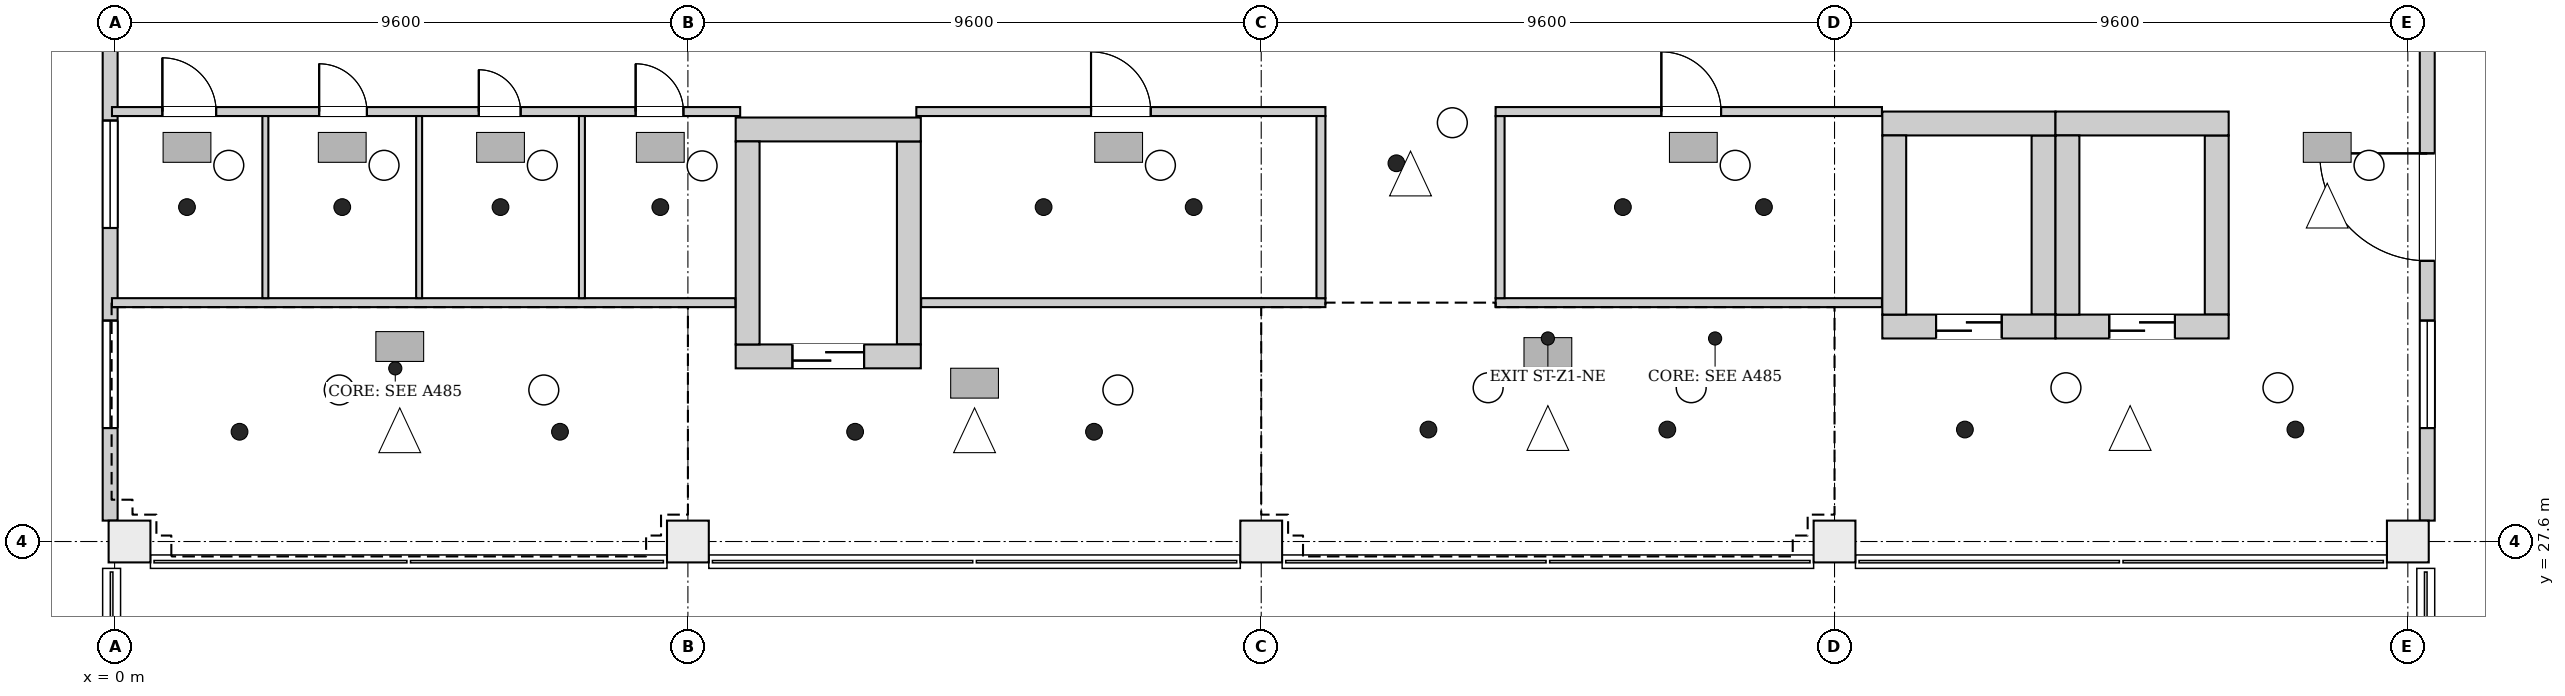
"""IFC4 building model, lengths in metres.
Left out: names, types, materials, properties, quantities, classifications, styles, units other than length and angle.
Written with IfcOpenShell. Run it as: python <this file> out.ifc"""

import sys

from ifc_helpers import new_model, si_unit, direction, frame, frame_2d, origin, origin_2d, place, context, subcontext, project, spatial, rectangle, extrude, element, fill, save


model = new_model("IFC4")
c1 = context("Model", 3, precision=1e-05, world=origin(), true_north=direction((0.0, 1.0)))
c2 = subcontext(c1, "Body", "Model", "MODEL_VIEW")
j1 = project(units=[si_unit("LENGTHUNIT", "METRE"), si_unit("PLANEANGLEUNIT", "RADIAN")], contexts=[c1])
p1 = place(None, origin())
s1 = spatial("IfcSite", under=j1, at=p1, CompositionType="ELEMENT")
p2 = place(p1, origin())
s2 = spatial("IfcBuilding", under=s1, at=p2, CompositionType="ELEMENT")
p3 = place(p2, frame((0.0, 0.0, 69.7)))
s3 = spatial("IfcBuildingStorey", under=s2, at=p3, CompositionType="ELEMENT", Elevation=69.7)
p4 = place(p3, frame((10.4, 30.7, 0.0), z_axis=(0.0, 0.0, 1.0), x_axis=(1.0, 0.0, 0.0)))
e1 = element("IfcWall", 1, at=p4, inside=s3, PredefinedType="SHEAR", context=c2, shape_type="SweptSolid", body=[
    extrude(rectangle(XDim=3.1, YDim=0.4, at=frame_2d((1.55, 0.0))), origin(), (0.0, 0.0, 1.0), 4.2),
])
p5 = place(p4, frame((0.95, 0.0, 0.0)))
e2 = element("IfcOpeningElement", 2, at=p5, cuts=e1, PredefinedType="OPENING", context=c2, shape_type="SweptSolid", body=[
    extrude(rectangle(XDim=1.2, YDim=2.1, at=frame_2d((0.6, 1.05))), frame((0.0, 0.21, 0.0), z_axis=(0.0, -1.0, 0.0), x_axis=(1.0, 0.0, 0.0)), (0.0, 0.0, 1.0), 0.42),
])
p6 = place(p3, frame((10.4, 34.5, 0.0), z_axis=(0.0, 0.0, 1.0), x_axis=(1.0, 0.0, 0.0)))
e3 = element("IfcWall", 3, at=p6, inside=s3, PredefinedType="SHEAR", context=c2, shape_type="SweptSolid", body=[
    extrude(rectangle(XDim=3.1, YDim=0.4, at=frame_2d((1.55, 0.0))), origin(), (0.0, 0.0, 1.0), 4.2),
])
for number, where, z_axis, x_axis in (
    (4, (10.6, 30.9, 0.0), (0.0, 0.0, 1.0), (0.0, 1.0, 0.0)),
    (5, (13.3, 30.9, 0.0), (0.0, 0.0, 1.0), (0.0, 1.0, 0.0)),
):
    element("IfcWall", number, at=place(p3, frame(where, z_axis=z_axis, x_axis=x_axis)), inside=s3, PredefinedType="SHEAR", context=c2, shape_type="SweptSolid", body=[
        extrude(rectangle(XDim=3.4, YDim=0.4, at=frame_2d((1.7, 0.0))), origin(), (0.0, 0.0, 1.0), 4.2),
    ])
p7 = place(p3, frame((29.6, 31.2, 0.0), z_axis=(0.0, 0.0, 1.0), x_axis=(1.0, 0.0, 0.0)))
e6 = element("IfcWall", 6, at=p7, inside=s3, PredefinedType="SHEAR", context=c2, shape_type="SweptSolid", body=[
    extrude(rectangle(XDim=2.9, YDim=0.4, at=frame_2d((1.45, 0.0))), origin(), (0.0, 0.0, 1.0), 4.2),
])
p8 = place(p7, frame((0.9, 0.0, 0.0)))
e7 = element("IfcOpeningElement", 7, at=p8, cuts=e6, PredefinedType="OPENING", context=c2, shape_type="SweptSolid", body=[
    extrude(rectangle(XDim=1.1, YDim=2.1, at=frame_2d((0.55, 1.05))), frame((0.0, 0.21, 0.0), z_axis=(0.0, -1.0, 0.0), x_axis=(1.0, 0.0, 0.0)), (0.0, 0.0, 1.0), 0.42),
])
p9 = place(p3, frame((29.6, 34.6, 0.0), z_axis=(0.0, 0.0, 1.0), x_axis=(1.0, 0.0, 0.0)))
e8 = element("IfcWall", 8, at=p9, inside=s3, PredefinedType="SHEAR", context=c2, shape_type="SweptSolid", body=[
    extrude(rectangle(XDim=2.9, YDim=0.4, at=frame_2d((1.45, 0.0))), origin(), (0.0, 0.0, 1.0), 4.2),
])
for number, where, z_axis, x_axis in (
    (9, (29.8, 31.4, 0.0), (0.0, 0.0, 1.0), (0.0, 1.0, 0.0)),
    (10, (32.3, 31.4, 0.0), (0.0, 0.0, 1.0), (0.0, 1.0, 0.0)),
):
    element("IfcWall", number, at=place(p3, frame(where, z_axis=z_axis, x_axis=x_axis)), inside=s3, PredefinedType="SHEAR", context=c2, shape_type="SweptSolid", body=[
        extrude(rectangle(XDim=3.0, YDim=0.4, at=frame_2d((1.5, 0.0))), origin(), (0.0, 0.0, 1.0), 4.2),
    ])
p10 = place(p3, frame((32.5, 31.2, 0.0), z_axis=(0.0, 0.0, 1.0), x_axis=(1.0, 0.0, 0.0)))
e11 = element("IfcWall", 11, at=p10, inside=s3, PredefinedType="SHEAR", context=c2, shape_type="SweptSolid", body=[
    extrude(rectangle(XDim=2.9, YDim=0.4, at=frame_2d((1.45, 0.0))), origin(), (0.0, 0.0, 1.0), 4.2),
])
p11 = place(p10, frame((0.9, 0.0, 0.0)))
e12 = element("IfcOpeningElement", 12, at=p11, cuts=e11, PredefinedType="OPENING", context=c2, shape_type="SweptSolid", body=[
    extrude(rectangle(XDim=1.1, YDim=2.1, at=frame_2d((0.55, 1.05))), frame((0.0, 0.21, 0.0), z_axis=(0.0, -1.0, 0.0), x_axis=(1.0, 0.0, 0.0)), (0.0, 0.0, 1.0), 0.42),
])
p12 = place(p3, frame((32.5, 34.6, 0.0), z_axis=(0.0, 0.0, 1.0), x_axis=(1.0, 0.0, 0.0)))
e13 = element("IfcWall", 13, at=p12, inside=s3, PredefinedType="SHEAR", context=c2, shape_type="SweptSolid", body=[
    extrude(rectangle(XDim=2.9, YDim=0.4, at=frame_2d((1.45, 0.0))), origin(), (0.0, 0.0, 1.0), 4.2),
])
for number, where, z_axis, x_axis in (
    (14, (32.7, 31.4, 0.0), (0.0, 0.0, 1.0), (0.0, 1.0, 0.0)),
    (15, (35.2, 31.4, 0.0), (0.0, 0.0, 1.0), (0.0, 1.0, 0.0)),
):
    element("IfcWall", number, at=place(p3, frame(where, z_axis=z_axis, x_axis=x_axis)), inside=s3, PredefinedType="SHEAR", context=c2, shape_type="SweptSolid", body=[
        extrude(rectangle(XDim=3.0, YDim=0.4, at=frame_2d((1.5, 0.0))), origin(), (0.0, 0.0, 1.0), 4.2),
    ])
for number, where, z_axis, x_axis in (
    (16, (0.25, 27.6, 0.0), (0.0, 0.0, 1.0), (1.0, 0.0, 0.0)),
    (17, (9.6, 27.6, 0.0), (0.0, 0.0, 1.0), (1.0, 0.0, 0.0)),
    (18, (19.2, 27.6, 0.0), (0.0, 0.0, 1.0), (1.0, 0.0, 0.0)),
    (19, (28.8, 27.6, 0.0), (0.0, 0.0, 1.0), (1.0, 0.0, 0.0)),
    (20, (38.4, 27.6, 0.0), (0.0, 0.0, 1.0), (1.0, 0.0, 0.0)),
):
    element("IfcColumn", number, at=place(p3, frame(where, z_axis=z_axis, x_axis=x_axis)), inside=s3, PredefinedType="COLUMN", context=c2, shape_type="SweptSolid", body=[
        extrude(rectangle(XDim=0.7, YDim=0.7, at=origin_2d()), origin(), (0.0, 0.0, 1.0), 4.2),
    ])
p13 = place(p3, frame((-0.074, 36.45, 0.0), z_axis=(0.0, 0.0, 1.0), x_axis=(0.0, -1.0, 0.0)))
e21 = element("IfcWall", 21, at=p13, inside=s3, PredefinedType="ELEMENTEDWALL", context=c2, shape_type="SweptSolid", body=[
    extrude(rectangle(XDim=8.5, YDim=0.25, at=frame_2d((4.25, 0.0))), origin(), (0.0, 0.0, 1.0), 3.9),
])
p14 = place(p13, frame((5.15, 0.0, 0.9)))
e22 = element("IfcOpeningElement", 22, at=p14, cuts=e21, PredefinedType="OPENING", context=c2, shape_type="SweptSolid", body=[
    extrude(rectangle(XDim=1.8, YDim=2.6, at=frame_2d((0.9, 1.3))), frame((0.0, 0.135, 0.0), z_axis=(0.0, -1.0, 0.0), x_axis=(1.0, 0.0, 0.0)), (0.0, 0.0, 1.0), 0.27),
])
p15 = place(p13, frame((1.8, 0.0, 0.9)))
e23 = element("IfcOpeningElement", 23, at=p15, cuts=e21, PredefinedType="OPENING", context=c2, shape_type="SweptSolid", body=[
    extrude(rectangle(XDim=1.8, YDim=2.6, at=frame_2d((0.9, 1.3))), frame((0.0, 0.135, 0.0), z_axis=(0.0, -1.0, 0.0), x_axis=(1.0, 0.0, 0.0)), (0.0, 0.0, 1.0), 0.27),
])
p16 = place(p3, frame((38.725, 27.95, 0.0), z_axis=(0.0, 0.0, 1.0), x_axis=(0.0, 1.0, 0.0)))
e24 = element("IfcWall", 24, at=p16, inside=s3, PredefinedType="ELEMENTEDWALL", context=c2, shape_type="SweptSolid", body=[
    extrude(rectangle(XDim=8.5, YDim=0.25, at=frame_2d((4.25, 0.0))), origin(), (0.0, 0.0, 1.0), 3.9),
])
p17 = place(p16, frame((4.35, 0.0, 0.0)))
e25 = element("IfcOpeningElement", 25, at=p17, cuts=e24, PredefinedType="OPENING", context=c2, shape_type="SweptSolid", body=[
    extrude(rectangle(XDim=1.8, YDim=2.4, at=frame_2d((0.9, 1.2))), frame((0.0, 0.135, 0.0), z_axis=(0.0, -1.0, 0.0), x_axis=(1.0, 0.0, 0.0)), (0.0, 0.0, 1.0), 0.27),
])
p18 = place(p16, frame((1.55, 0.0, 0.9)))
e26 = element("IfcOpeningElement", 26, at=p18, cuts=e24, PredefinedType="OPENING", context=c2, shape_type="SweptSolid", body=[
    extrude(rectangle(XDim=1.8, YDim=2.6, at=frame_2d((0.9, 1.3))), frame((0.0, 0.135, 0.0), z_axis=(0.0, -1.0, 0.0), x_axis=(1.0, 0.0, 0.0)), (0.0, 0.0, 1.0), 0.27),
])
p19 = place(p3, frame((-0.044, 31.6, 0.0), z_axis=(0.0, 0.0, 1.0), x_axis=(1.0, 0.0, 0.0)))
e27 = element("IfcWall", 27, at=p19, inside=s3, PredefinedType="PARTITIONING", context=c2, shape_type="SweptSolid", body=[
    extrude(rectangle(XDim=10.438, YDim=0.15, at=frame_2d((5.219, 0.0))), origin(), (0.0, 0.0, 1.0), 3.9),
])
p20 = place(p3, frame((-0.044, 34.8, 0.0), z_axis=(0.0, 0.0, 1.0), x_axis=(1.0, 0.0, 0.0)))
e28 = element("IfcWall", 28, at=p20, inside=s3, PredefinedType="PARTITIONING", context=c2, shape_type="SweptSolid", body=[
    extrude(rectangle(XDim=10.519, YDim=0.15, at=frame_2d((5.26, 0.0))), origin(), (0.0, 0.0, 1.0), 3.9),
])
p21 = place(p20, frame((0.844, 0.0, 0.0)))
e29 = element("IfcOpeningElement", 29, at=p21, cuts=e28, PredefinedType="OPENING", context=c2, shape_type="SweptSolid", body=[
    extrude(rectangle(XDim=0.9, YDim=2.1, at=frame_2d((0.45, 1.05))), frame((0.0, 0.085, 0.0), z_axis=(0.0, -1.0, 0.0), x_axis=(1.0, 0.0, 0.0)), (0.0, 0.0, 1.0), 0.17),
])
p22 = place(p20, frame((3.469, 0.0, 0.0)))
e30 = element("IfcOpeningElement", 30, at=p22, cuts=e28, PredefinedType="OPENING", context=c2, shape_type="SweptSolid", body=[
    extrude(rectangle(XDim=0.8, YDim=2.1, at=frame_2d((0.4, 1.05))), frame((0.0, 0.085, 0.0), z_axis=(0.0, -1.0, 0.0), x_axis=(1.0, 0.0, 0.0)), (0.0, 0.0, 1.0), 0.17),
])
p23 = place(p20, frame((6.143, 0.0, 0.0)))
e31 = element("IfcOpeningElement", 31, at=p23, cuts=e28, PredefinedType="OPENING", context=c2, shape_type="SweptSolid", body=[
    extrude(rectangle(XDim=0.7, YDim=2.1, at=frame_2d((0.35, 1.05))), frame((0.0, 0.085, 0.0), z_axis=(0.0, -1.0, 0.0), x_axis=(1.0, 0.0, 0.0)), (0.0, 0.0, 1.0), 0.17),
])
p24 = place(p20, frame((8.769, 0.0, 0.0)))
e32 = element("IfcOpeningElement", 32, at=p24, cuts=e28, PredefinedType="OPENING", context=c2, shape_type="SweptSolid", body=[
    extrude(rectangle(XDim=0.8, YDim=2.1, at=frame_2d((0.4, 1.05))), frame((0.0, 0.085, 0.0), z_axis=(0.0, -1.0, 0.0), x_axis=(1.0, 0.0, 0.0)), (0.0, 0.0, 1.0), 0.17),
])
for number, where, z_axis, x_axis in (
    (33, (2.525, 31.675, 0.0), (0.0, 0.0, 1.0), (0.0, 1.0, 0.0)),
    (34, (5.099, 31.675, 0.0), (0.0, 0.0, 1.0), (0.0, 1.0, 0.0)),
    (35, (7.825, 31.675, 0.0), (0.0, 0.0, 1.0), (0.0, 1.0, 0.0)),
):
    element("IfcWall", number, at=place(p3, frame(where, z_axis=z_axis, x_axis=x_axis)), inside=s3, PredefinedType="PARTITIONING", context=c2, shape_type="SweptSolid", body=[
        extrude(rectangle(XDim=3.05, YDim=0.1, at=frame_2d((1.525, 0.0))), origin(), (0.0, 0.0, 1.0), 3.9),
    ])
p25 = place(p3, frame((13.425, 34.8, 0.0), z_axis=(0.0, 0.0, 1.0), x_axis=(1.0, 0.0, 0.0)))
e36 = element("IfcWall", 36, at=p25, inside=s3, PredefinedType="PARTITIONING", context=c2, shape_type="SweptSolid", body=[
    extrude(rectangle(XDim=6.85, YDim=0.15, at=frame_2d((3.425, 0.0))), origin(), (0.0, 0.0, 1.0), 3.9),
])
p26 = place(p25, frame((2.925, 0.0, 0.0)))
e37 = element("IfcOpeningElement", 37, at=p26, cuts=e36, PredefinedType="OPENING", context=c2, shape_type="SweptSolid", body=[
    extrude(rectangle(XDim=1.0, YDim=2.1, at=frame_2d((0.5, 1.05))), frame((0.0, 0.085, 0.0), z_axis=(0.0, -1.0, 0.0), x_axis=(1.0, 0.0, 0.0)), (0.0, 0.0, 1.0), 0.17),
])
p27 = place(p3, frame((13.506, 31.6, 0.0), z_axis=(0.0, 0.0, 1.0), x_axis=(1.0, 0.0, 0.0)))
e38 = element("IfcWall", 38, at=p27, inside=s3, PredefinedType="PARTITIONING", context=c2, shape_type="SweptSolid", body=[
    extrude(rectangle(XDim=6.769, YDim=0.15, at=frame_2d((3.384, 0.0))), origin(), (0.0, 0.0, 1.0), 3.9),
])
p28 = place(p3, frame((20.2, 31.675, 0.0), z_axis=(0.0, 0.0, 1.0), x_axis=(0.0, 1.0, 0.0)))
e39 = element("IfcWall", 39, at=p28, inside=s3, PredefinedType="PARTITIONING", context=c2, shape_type="SweptSolid", body=[
    extrude(rectangle(XDim=3.05, YDim=0.15, at=frame_2d((1.525, 0.0))), origin(), (0.0, 0.0, 1.0), 3.9),
])
p29 = place(p3, frame((23.125, 31.6, 0.0), z_axis=(0.0, 0.0, 1.0), x_axis=(1.0, 0.0, 0.0)))
e40 = element("IfcWall", 40, at=p29, inside=s3, PredefinedType="PARTITIONING", context=c2, shape_type="SweptSolid", body=[
    extrude(rectangle(XDim=6.469, YDim=0.15, at=frame_2d((3.234, 0.0))), origin(), (0.0, 0.0, 1.0), 3.9),
])
p30 = place(p3, frame((23.2, 31.675, 0.0), z_axis=(0.0, 0.0, 1.0), x_axis=(0.0, 1.0, 0.0)))
e41 = element("IfcWall", 41, at=p30, inside=s3, PredefinedType="PARTITIONING", context=c2, shape_type="SweptSolid", body=[
    extrude(rectangle(XDim=3.05, YDim=0.15, at=frame_2d((1.525, 0.0))), origin(), (0.0, 0.0, 1.0), 3.9),
])
p31 = place(p3, frame((23.125, 34.8, 0.0), z_axis=(0.0, 0.0, 1.0), x_axis=(1.0, 0.0, 0.0)))
e42 = element("IfcWall", 42, at=p31, inside=s3, PredefinedType="PARTITIONING", context=c2, shape_type="SweptSolid", body=[
    extrude(rectangle(XDim=6.469, YDim=0.15, at=frame_2d((3.234, 0.0))), origin(), (0.0, 0.0, 1.0), 3.9),
])
p32 = place(p31, frame((2.775, 0.0, 0.0)))
e43 = element("IfcOpeningElement", 43, at=p32, cuts=e42, PredefinedType="OPENING", context=c2, shape_type="SweptSolid", body=[
    extrude(rectangle(XDim=1.0, YDim=2.1, at=frame_2d((0.5, 1.05))), frame((0.0, 0.085, 0.0), z_axis=(0.0, -1.0, 0.0), x_axis=(1.0, 0.0, 0.0)), (0.0, 0.0, 1.0), 0.17),
])
p33 = place(p14, origin())
e44 = element("IfcWindow", 44, at=p33, inside=s3, PartitioningType="SINGLE_PANEL", PredefinedType="WINDOW", context=c2, shape_type="SweptSolid", body=[
    extrude(rectangle(XDim=1.8, YDim=2.6, at=frame_2d((0.9, 1.3))), frame((0.0, 0.03, 0.0), z_axis=(0.0, -1.0, 0.0), x_axis=(1.0, 0.0, 0.0)), (0.0, 0.0, 1.0), 0.06),
])
fill(e22, e44)
p34 = place(p15, origin())
e45 = element("IfcWindow", 45, at=p34, inside=s3, PartitioningType="SINGLE_PANEL", PredefinedType="WINDOW", context=c2, shape_type="SweptSolid", body=[
    extrude(rectangle(XDim=1.8, YDim=2.6, at=frame_2d((0.9, 1.3))), frame((0.0, 0.03, 0.0), z_axis=(0.0, -1.0, 0.0), x_axis=(1.0, 0.0, 0.0)), (0.0, 0.0, 1.0), 0.06),
])
fill(e23, e45)
p35 = place(p17, frame((1.8, 0.0, 0.0), z_axis=(0.0, 0.0, 1.0), x_axis=(-1.0, 0.0, 0.0)))
e46 = element("IfcDoor", 46, at=p35, inside=s3, OperationType="DOUBLE_DOOR_SINGLE_SWING", PredefinedType="DOOR", context=c2, shape_type="SweptSolid", body=[
    extrude(rectangle(XDim=1.8, YDim=2.4, at=frame_2d((0.9, 1.2))), frame((0.0, 0.025, 0.0), z_axis=(0.0, -1.0, 0.0), x_axis=(1.0, 0.0, 0.0)), (0.0, 0.0, 1.0), 0.05),
])
fill(e25, e46)
p36 = place(p18, origin())
e47 = element("IfcWindow", 47, at=p36, inside=s3, PartitioningType="SINGLE_PANEL", PredefinedType="WINDOW", context=c2, shape_type="SweptSolid", body=[
    extrude(rectangle(XDim=1.8, YDim=2.6, at=frame_2d((0.9, 1.3))), frame((0.0, 0.03, 0.0), z_axis=(0.0, -1.0, 0.0), x_axis=(1.0, 0.0, 0.0)), (0.0, 0.0, 1.0), 0.06),
])
fill(e26, e47)
p37 = place(p5, origin())
e48 = element("IfcDoor", 48, at=p37, inside=s3, OperationType="DOUBLE_DOOR_SLIDING", PredefinedType="DOOR", context=c2, shape_type="SweptSolid", body=[
    extrude(rectangle(XDim=1.2, YDim=2.1, at=frame_2d((0.6, 1.05))), frame((0.0, 0.025, 0.0), z_axis=(0.0, -1.0, 0.0), x_axis=(1.0, 0.0, 0.0)), (0.0, 0.0, 1.0), 0.05),
])
fill(e2, e48)
p38 = place(p8, origin())
e49 = element("IfcDoor", 49, at=p38, inside=s3, OperationType="DOUBLE_DOOR_SLIDING", PredefinedType="DOOR", context=c2, shape_type="SweptSolid", body=[
    extrude(rectangle(XDim=1.1, YDim=2.1, at=frame_2d((0.55, 1.05))), frame((0.0, 0.025, 0.0), z_axis=(0.0, -1.0, 0.0), x_axis=(1.0, 0.0, 0.0)), (0.0, 0.0, 1.0), 0.05),
])
fill(e7, e49)
p39 = place(p11, origin())
e50 = element("IfcDoor", 50, at=p39, inside=s3, OperationType="DOUBLE_DOOR_SLIDING", PredefinedType="DOOR", context=c2, shape_type="SweptSolid", body=[
    extrude(rectangle(XDim=1.1, YDim=2.1, at=frame_2d((0.55, 1.05))), frame((0.0, 0.025, 0.0), z_axis=(0.0, -1.0, 0.0), x_axis=(1.0, 0.0, 0.0)), (0.0, 0.0, 1.0), 0.05),
])
fill(e12, e50)
p40 = place(p21, origin())
e51 = element("IfcDoor", 51, at=p40, inside=s3, OperationType="SINGLE_SWING_RIGHT", PredefinedType="DOOR", context=c2, shape_type="SweptSolid", body=[
    extrude(rectangle(XDim=0.9, YDim=2.1, at=frame_2d((0.45, 1.05))), frame((0.0, 0.025, 0.0), z_axis=(0.0, -1.0, 0.0), x_axis=(1.0, 0.0, 0.0)), (0.0, 0.0, 1.0), 0.05),
])
fill(e29, e51)
p41 = place(p22, origin())
e52 = element("IfcDoor", 52, at=p41, inside=s3, OperationType="SINGLE_SWING_RIGHT", PredefinedType="DOOR", context=c2, shape_type="SweptSolid", body=[
    extrude(rectangle(XDim=0.8, YDim=2.1, at=frame_2d((0.4, 1.05))), frame((0.0, 0.025, 0.0), z_axis=(0.0, -1.0, 0.0), x_axis=(1.0, 0.0, 0.0)), (0.0, 0.0, 1.0), 0.05),
])
fill(e30, e52)
p42 = place(p23, origin())
e53 = element("IfcDoor", 53, at=p42, inside=s3, OperationType="SINGLE_SWING_LEFT", PredefinedType="DOOR", context=c2, shape_type="SweptSolid", body=[
    extrude(rectangle(XDim=0.7, YDim=2.1, at=frame_2d((0.35, 1.05))), frame((0.0, 0.025, 0.0), z_axis=(0.0, -1.0, 0.0), x_axis=(1.0, 0.0, 0.0)), (0.0, 0.0, 1.0), 0.05),
])
fill(e31, e53)
p43 = place(p24, origin())
e54 = element("IfcDoor", 54, at=p43, inside=s3, OperationType="SINGLE_SWING_LEFT", PredefinedType="DOOR", context=c2, shape_type="SweptSolid", body=[
    extrude(rectangle(XDim=0.8, YDim=2.1, at=frame_2d((0.4, 1.05))), frame((0.0, 0.025, 0.0), z_axis=(0.0, -1.0, 0.0), x_axis=(1.0, 0.0, 0.0)), (0.0, 0.0, 1.0), 0.05),
])
fill(e32, e54)
p44 = place(p26, origin())
e55 = element("IfcDoor", 55, at=p44, inside=s3, OperationType="SINGLE_SWING_RIGHT", PredefinedType="DOOR", context=c2, shape_type="SweptSolid", body=[
    extrude(rectangle(XDim=1.0, YDim=2.1, at=frame_2d((0.5, 1.05))), frame((0.0, 0.025, 0.0), z_axis=(0.0, -1.0, 0.0), x_axis=(1.0, 0.0, 0.0)), (0.0, 0.0, 1.0), 0.05),
])
fill(e37, e55)
p45 = place(p32, origin())
e56 = element("IfcDoor", 56, at=p45, inside=s3, OperationType="SINGLE_SWING_LEFT", PredefinedType="DOOR", context=c2, shape_type="SweptSolid", body=[
    extrude(rectangle(XDim=1.0, YDim=2.1, at=frame_2d((0.5, 1.05))), frame((0.0, 0.025, 0.0), z_axis=(0.0, -1.0, 0.0), x_axis=(1.0, 0.0, 0.0)), (0.0, 0.0, 1.0), 0.05),
])
fill(e43, e56)
save(model, sys.argv[1])
